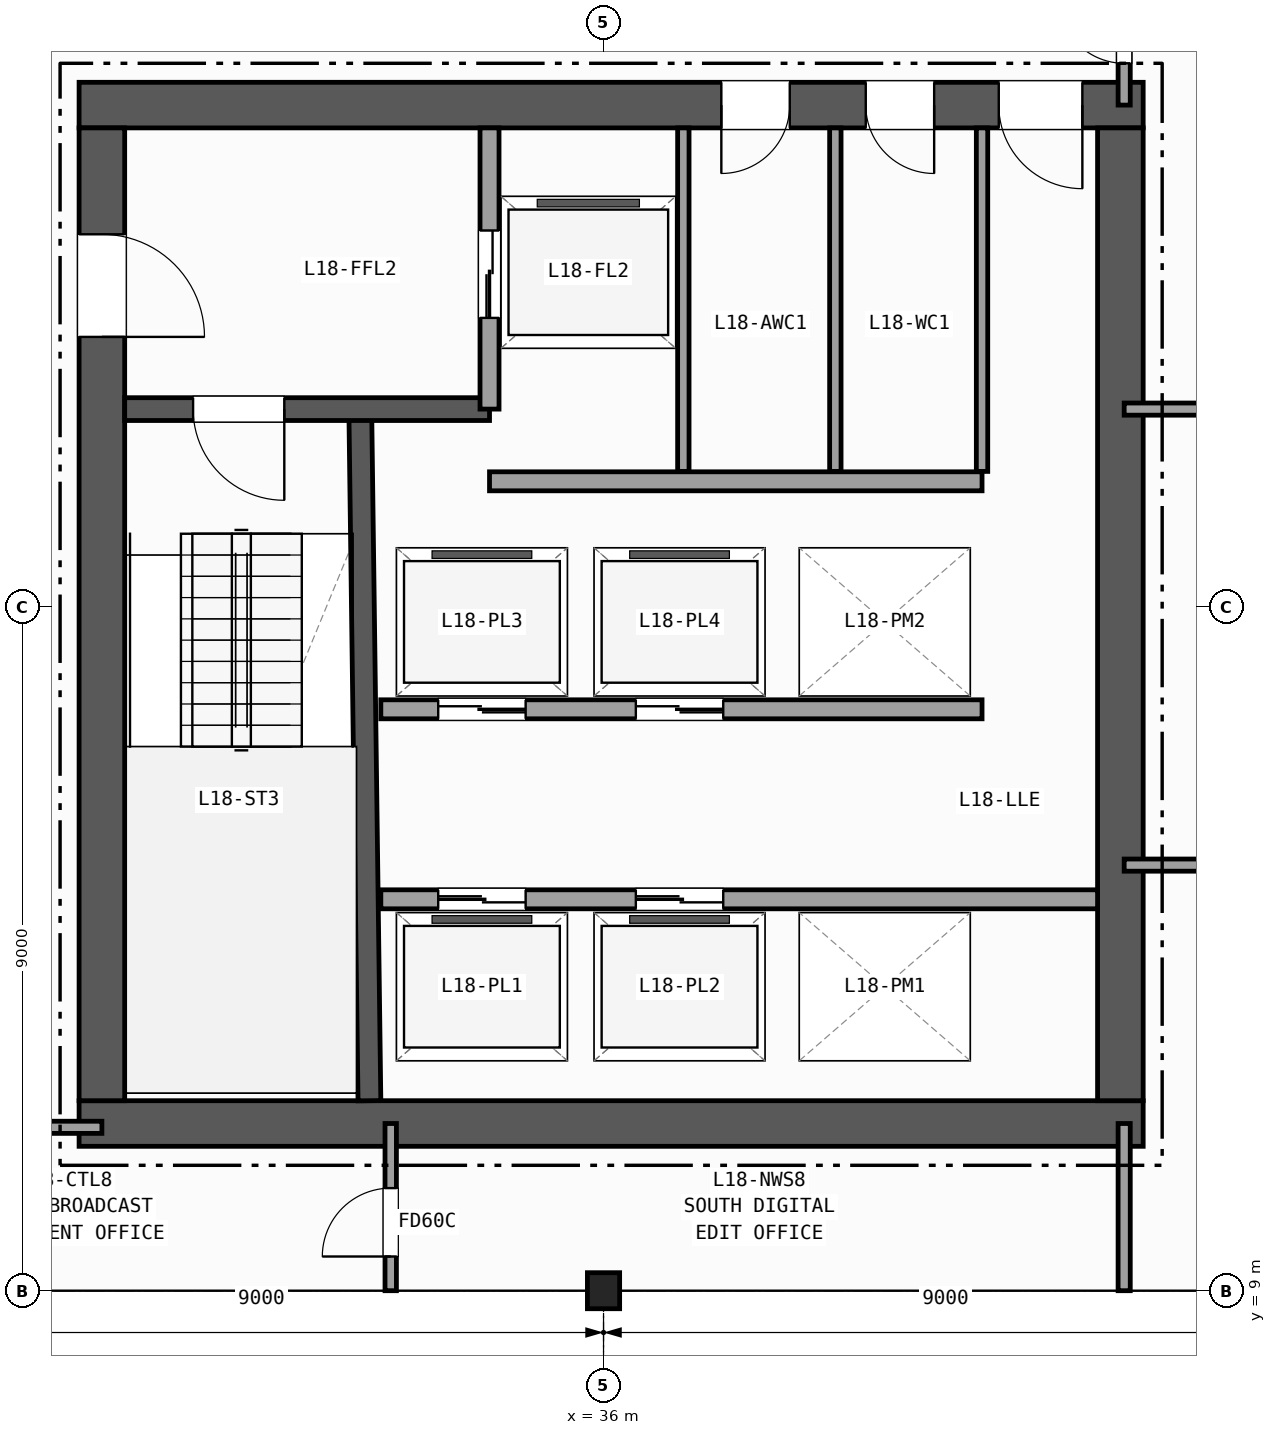
"""IFC4 building model, lengths in metres.
Left out: names, types, materials, properties, quantities, classifications, styles, units other than length and angle.
Written with IfcOpenShell. Run it as: python <this file> out.ifc"""

import sys

from ifc_helpers import new_model, si_unit, direction, frame, frame_2d, origin, origin_2d, place, context, subcontext, project, spatial, rectangle, i_section, extrude, element, fill, save


model = new_model("IFC4")
c1 = context("Model", 3, precision=1e-05, world=origin(), true_north=direction((0.0, 1.0)))
c2 = subcontext(c1, "Body", "Model", "MODEL_VIEW")
j1 = project(units=[si_unit("LENGTHUNIT", "METRE"), si_unit("PLANEANGLEUNIT", "RADIAN")], contexts=[c1])
p1 = place(None, origin())
s1 = spatial("IfcSite", under=j1, at=p1, CompositionType="ELEMENT")
p2 = place(p1, origin())
s2 = spatial("IfcBuilding", under=s1, at=p2, CompositionType="ELEMENT")
p3 = place(p2, frame((0.0, 0.0, 76.7)))
s3 = spatial("IfcBuildingStorey", under=s2, at=p3, CompositionType="ELEMENT", Elevation=76.7)
p4 = place(p3, frame((36.0, 9.0, 0.0), z_axis=(0.0, 0.0, 1.0), x_axis=(1.0, 0.0, 0.0)))
e1 = element("IfcColumn", 1, at=p4, inside=s3, PredefinedType="COLUMN", context=c2, shape_type="SweptSolid", body=[
    extrude(i_section(OverallWidth=0.424, OverallDepth=0.474, WebThickness=0.048, FlangeThickness=0.077, FilletRadius=0.015, at=origin_2d()), origin(), (0.0, 0.0, 1.0), 3.7),
])
p5 = place(p3, frame((29.1, 11.2, 0.0), z_axis=(0.0, 0.0, 1.0), x_axis=(1.0, 0.0, 0.0)))
e2 = element("IfcWall", 2, at=p5, inside=s3, PredefinedType="SHEAR", context=c2, shape_type="SweptSolid", body=[
    extrude(rectangle(XDim=14.0, YDim=0.6, at=frame_2d((7.0, 0.0))), origin(), (0.0, 0.0, 1.0), 3.42),
])
p6 = place(p3, frame((43.1, 24.6, 0.0), z_axis=(0.0, 0.0, 1.0), x_axis=(-1.0, 0.0, 0.0)))
e3 = element("IfcWall", 3, at=p6, inside=s3, PredefinedType="SHEAR", context=c2, shape_type="SweptSolid", body=[
    extrude(rectangle(XDim=14.0, YDim=0.6, at=frame_2d((7.0, 0.0))), origin(), (0.0, 0.0, 1.0), 3.42),
])
p7 = place(p6, frame((0.8, 0.0, 0.0)))
e4 = element("IfcOpeningElement", 4, at=p7, cuts=e3, PredefinedType="OPENING", context=c2, shape_type="SweptSolid", body=[
    extrude(rectangle(XDim=1.1, YDim=2.15, at=frame_2d((0.55, 1.075))), frame((0.0, 0.31, 0.0), z_axis=(0.0, -1.0, 0.0), x_axis=(1.0, 0.0, 0.0)), (0.0, 0.0, 1.0), 0.62),
])
p8 = place(p6, frame((2.75, 0.0, 0.0)))
e5 = element("IfcOpeningElement", 5, at=p8, cuts=e3, PredefinedType="OPENING", context=c2, shape_type="SweptSolid", body=[
    extrude(rectangle(XDim=0.9, YDim=2.1, at=frame_2d((0.45, 1.05))), frame((0.0, 0.31, 0.0), z_axis=(0.0, -1.0, 0.0), x_axis=(1.0, 0.0, 0.0)), (0.0, 0.0, 1.0), 0.62),
])
p9 = place(p6, frame((4.65, 0.0, 0.0)))
e6 = element("IfcOpeningElement", 6, at=p9, cuts=e3, PredefinedType="OPENING", context=c2, shape_type="SweptSolid", body=[
    extrude(rectangle(XDim=0.9, YDim=2.1, at=frame_2d((0.45, 1.05))), frame((0.0, 0.31, 0.0), z_axis=(0.0, -1.0, 0.0), x_axis=(1.0, 0.0, 0.0)), (0.0, 0.0, 1.0), 0.62),
])
p10 = place(p3, frame((29.4, 24.3, 0.0), z_axis=(0.0, 0.0, 1.0), x_axis=(0.0, -1.0, 0.0)))
e7 = element("IfcWall", 7, at=p10, inside=s3, PredefinedType="SHEAR", context=c2, shape_type="SweptSolid", body=[
    extrude(rectangle(XDim=12.8, YDim=0.6, at=frame_2d((6.4, 0.0))), origin(), (0.0, 0.0, 1.0), 3.42),
])
p11 = place(p10, frame((1.4, 0.0, 0.0)))
e8 = element("IfcOpeningElement", 8, at=p11, cuts=e7, PredefinedType="OPENING", context=c2, shape_type="SweptSolid", body=[
    extrude(rectangle(XDim=1.35, YDim=2.15, at=frame_2d((0.675, 1.075))), frame((0.0, 0.31, 0.0), z_axis=(0.0, -1.0, 0.0), x_axis=(1.0, 0.0, 0.0)), (0.0, 0.0, 1.0), 0.62),
])
p12 = place(p3, frame((42.8, 11.5, 0.0), z_axis=(0.0, 0.0, 1.0), x_axis=(0.0, 1.0, 0.0)))
e9 = element("IfcWall", 9, at=p12, inside=s3, PredefinedType="SHEAR", context=c2, shape_type="SweptSolid", body=[
    extrude(rectangle(XDim=12.8, YDim=0.6, at=frame_2d((6.4, 0.0))), origin(), (0.0, 0.0, 1.0), 3.42),
])
p13 = place(p3, frame((32.92, 11.5, 0.0), z_axis=(0.0, 0.0, 1.0), x_axis=(-0.013244407292, 0.999912288991, 0.0)))
e10 = element("IfcWall", 10, at=p13, inside=s3, PredefinedType="SHEAR", context=c2, shape_type="SweptSolid", body=[
    extrude(rectangle(XDim=9.051, YDim=0.3, at=frame_2d((4.525, 0.0))), origin(), (0.0, 0.0, 1.0), 3.42),
])
p14 = place(p3, frame((34.5, 20.6, 0.0), z_axis=(0.0, 0.0, 1.0), x_axis=(-1.0, 0.0, 0.0)))
e11 = element("IfcWall", 11, at=p14, inside=s3, PredefinedType="SHEAR", context=c2, shape_type="SweptSolid", body=[
    extrude(rectangle(XDim=4.8, YDim=0.3, at=frame_2d((2.4, 0.0))), origin(), (0.0, 0.0, 1.0), 3.42),
])
p15 = place(p14, frame((2.7, 0.0, 0.0)))
e12 = element("IfcOpeningElement", 12, at=p15, cuts=e11, PredefinedType="OPENING", context=c2, shape_type="SweptSolid", body=[
    extrude(rectangle(XDim=1.2, YDim=2.15, at=frame_2d((0.6, 1.075))), frame((0.0, 0.16, 0.0), z_axis=(0.0, -1.0, 0.0), x_axis=(1.0, 0.0, 0.0)), (0.0, 0.0, 1.0), 0.32),
])
p16 = place(p3, frame((34.5, 20.6, 0.0), z_axis=(0.0, 0.0, 1.0), x_axis=(0.0, 1.0, 0.0)))
e13 = element("IfcWall", 13, at=p16, inside=s3, PredefinedType="PARTITIONING", context=c2, shape_type="SweptSolid", body=[
    extrude(rectangle(XDim=3.7, YDim=0.25, at=frame_2d((1.85, 0.0))), origin(), (0.0, 0.0, 1.0), 3.42),
])
p17 = place(p16, frame((1.2, 0.0, 0.0)))
e14 = element("IfcOpeningElement", 14, at=p17, cuts=e13, PredefinedType="OPENING", context=c2, shape_type="SweptSolid", body=[
    extrude(rectangle(XDim=1.15, YDim=2.15, at=frame_2d((0.575, 1.075))), frame((0.0, 0.135, 0.0), z_axis=(0.0, -1.0, 0.0), x_axis=(1.0, 0.0, 0.0)), (0.0, 0.0, 1.0), 0.27),
])
p18 = place(p3, frame((34.5, 19.65, 0.0), z_axis=(0.0, 0.0, 1.0), x_axis=(1.0, 0.0, 0.0)))
e15 = element("IfcWall", 15, at=p18, inside=s3, PredefinedType="PARTITIONING", context=c2, shape_type="SweptSolid", body=[
    extrude(rectangle(XDim=6.48, YDim=0.25, at=frame_2d((3.24, 0.0))), origin(), (0.0, 0.0, 1.0), 3.42),
])
p19 = place(p3, frame((33.07, 14.15, 0.0), z_axis=(0.0, 0.0, 1.0), x_axis=(1.0, 0.0, 0.0)))
e16 = element("IfcWall", 16, at=p19, inside=s3, PredefinedType="PARTITIONING", context=c2, shape_type="SweptSolid", body=[
    extrude(rectangle(XDim=9.43, YDim=0.25, at=frame_2d((4.715, 0.0))), origin(), (0.0, 0.0, 1.0), 3.42),
])
p20 = place(p19, frame((0.755, 0.0, 0.0)))
e17 = element("IfcOpeningElement", 17, at=p20, cuts=e16, PredefinedType="OPENING", context=c2, shape_type="SweptSolid", body=[
    extrude(rectangle(XDim=1.15, YDim=2.15, at=frame_2d((0.575, 1.075))), frame((0.0, 0.135, 0.0), z_axis=(0.0, -1.0, 0.0), x_axis=(1.0, 0.0, 0.0)), (0.0, 0.0, 1.0), 0.27),
])
p21 = place(p19, frame((3.355, 0.0, 0.0)))
e18 = element("IfcOpeningElement", 18, at=p21, cuts=e16, PredefinedType="OPENING", context=c2, shape_type="SweptSolid", body=[
    extrude(rectangle(XDim=1.15, YDim=2.15, at=frame_2d((0.575, 1.075))), frame((0.0, 0.135, 0.0), z_axis=(0.0, -1.0, 0.0), x_axis=(1.0, 0.0, 0.0)), (0.0, 0.0, 1.0), 0.27),
])
p22 = place(p3, frame((40.98, 16.65, 0.0), z_axis=(0.0, 0.0, 1.0), x_axis=(-1.0, 0.0, 0.0)))
e19 = element("IfcWall", 19, at=p22, inside=s3, PredefinedType="PARTITIONING", context=c2, shape_type="SweptSolid", body=[
    extrude(rectangle(XDim=7.91, YDim=0.25, at=frame_2d((3.955, 0.0))), origin(), (0.0, 0.0, 1.0), 3.42),
])
p23 = place(p22, frame((6.005, 0.0, 0.0)))
e20 = element("IfcOpeningElement", 20, at=p23, cuts=e19, PredefinedType="OPENING", context=c2, shape_type="SweptSolid", body=[
    extrude(rectangle(XDim=1.15, YDim=2.15, at=frame_2d((0.575, 1.075))), frame((0.0, 0.135, 0.0), z_axis=(0.0, -1.0, 0.0), x_axis=(1.0, 0.0, 0.0)), (0.0, 0.0, 1.0), 0.27),
])
p24 = place(p22, frame((3.405, 0.0, 0.0)))
e21 = element("IfcOpeningElement", 21, at=p24, cuts=e19, PredefinedType="OPENING", context=c2, shape_type="SweptSolid", body=[
    extrude(rectangle(XDim=1.15, YDim=2.15, at=frame_2d((0.575, 1.075))), frame((0.0, 0.135, 0.0), z_axis=(0.0, -1.0, 0.0), x_axis=(1.0, 0.0, 0.0)), (0.0, 0.0, 1.0), 0.27),
])
for number, where, z_axis, x_axis in (
    (22, (37.05, 19.78, 0.0), (0.0, 0.0, 1.0), (0.0, 1.0, 0.0)),
    (23, (39.05, 19.78, 0.0), (0.0, 0.0, 1.0), (0.0, 1.0, 0.0)),
    (24, (40.98, 19.78, 0.0), (0.0, 0.0, 1.0), (0.0, 1.0, 0.0)),
):
    element("IfcWall", number, at=place(p3, frame(where, z_axis=z_axis, x_axis=x_axis)), inside=s3, PredefinedType="PARTITIONING", context=c2, shape_type="SweptSolid", body=[
        extrude(rectangle(XDim=4.52, YDim=0.15, at=frame_2d((2.26, 0.0))), origin(), (0.0, 0.0, 1.0), 3.42),
    ])
p25 = place(p3, frame((24.65, 11.15, 0.0), z_axis=(0.0, 0.0, 1.0), x_axis=(1.0, 0.0, 0.0)))
e25 = element("IfcWall", 25, at=p25, inside=s3, PredefinedType="PARTITIONING", context=c2, shape_type="SweptSolid", body=[
    extrude(rectangle(XDim=4.75, YDim=0.16, at=frame_2d((2.375, 0.0))), origin(), (0.0, 0.0, 1.0), 2.792),
])
p26 = place(p25, frame((1.2, 0.0, 0.0)))
e26 = element("IfcOpeningElement", 26, at=p26, cuts=e25, PredefinedType="OPENING", context=c2, shape_type="SweptSolid", body=[
    extrude(rectangle(XDim=1.05, YDim=2.15, at=frame_2d((0.525, 1.075))), frame((0.0, 0.09, 0.0), z_axis=(0.0, -1.0, 0.0), x_axis=(1.0, 0.0, 0.0)), (0.0, 0.0, 1.0), 0.18),
])
p27 = place(p3, frame((33.2, 9.0, 0.0), z_axis=(0.0, 0.0, 1.0), x_axis=(0.0, 1.0, 0.0)))
e27 = element("IfcWall", 27, at=p27, inside=s3, PredefinedType="PARTITIONING", context=c2, shape_type="SweptSolid", body=[
    extrude(rectangle(XDim=2.2, YDim=0.15, at=frame_2d((1.1, 0.0))), origin(), (0.0, 0.0, 1.0), 2.627),
])
p28 = place(p27, frame((0.45, 0.0, 0.0)))
e28 = element("IfcOpeningElement", 28, at=p28, cuts=e27, PredefinedType="OPENING", context=c2, shape_type="SweptSolid", body=[
    extrude(rectangle(XDim=0.9, YDim=2.1, at=frame_2d((0.45, 1.05))), frame((0.0, 0.085, 0.0), z_axis=(0.0, -1.0, 0.0), x_axis=(1.0, 0.0, 0.0)), (0.0, 0.0, 1.0), 0.17),
])
p29 = place(p3, frame((42.85, 9.0, 0.0), z_axis=(0.0, 0.0, 1.0), x_axis=(0.0, 1.0, 0.0)))
e29 = element("IfcWall", 29, at=p29, inside=s3, PredefinedType="PARTITIONING", context=c2, shape_type="SweptSolid", body=[
    extrude(rectangle(XDim=2.2, YDim=0.16, at=frame_2d((1.1, 0.0))), origin(), (0.0, 0.0, 1.0), 2.627),
])
p30 = place(p3, frame((42.85, 24.6, 0.0), z_axis=(0.0, 0.0, 1.0), x_axis=(0.0, 1.0, 0.0)))
e30 = element("IfcWall", 30, at=p30, inside=s3, PredefinedType="PARTITIONING", context=c2, shape_type="SweptSolid", body=[
    extrude(rectangle(XDim=2.4, YDim=0.16, at=frame_2d((1.2, 0.0))), origin(), (0.0, 0.0, 1.0), 2.627),
])
p31 = place(p30, frame((0.55, 0.0, 0.0)))
e31 = element("IfcOpeningElement", 31, at=p31, cuts=e30, PredefinedType="OPENING", context=c2, shape_type="SweptSolid", body=[
    extrude(rectangle(XDim=0.86, YDim=2.05, at=frame_2d((0.43, 1.025))), frame((0.0, 0.09, 0.0), z_axis=(0.0, -1.0, 0.0), x_axis=(1.0, 0.0, 0.0)), (0.0, 0.0, 1.0), 0.18),
])
p32 = place(p3, frame((42.85, 14.6, 0.0), z_axis=(0.0, 0.0, 1.0), x_axis=(1.0, 0.0, 0.0)))
e32 = element("IfcWall", 32, at=p32, inside=s3, PredefinedType="PARTITIONING", context=c2, shape_type="SweptSolid", body=[
    extrude(rectangle(XDim=20.5, YDim=0.16, at=frame_2d((10.25, 0.0))), origin(), (0.0, 0.0, 1.0), 3.42),
])
p33 = place(p32, frame((3.4, 0.0, 0.0)))
e33 = element("IfcOpeningElement", 33, at=p33, cuts=e32, PredefinedType="OPENING", context=c2, shape_type="SweptSolid", body=[
    extrude(rectangle(XDim=0.95, YDim=2.1, at=frame_2d((0.475, 1.05))), frame((0.0, 0.09, 0.0), z_axis=(0.0, -1.0, 0.0), x_axis=(1.0, 0.0, 0.0)), (0.0, 0.0, 1.0), 0.18),
])
p34 = place(p3, frame((42.85, 20.6, 0.0), z_axis=(0.0, 0.0, 1.0), x_axis=(1.0, 0.0, 0.0)))
e34 = element("IfcWall", 34, at=p34, inside=s3, PredefinedType="PARTITIONING", context=c2, shape_type="SweptSolid", body=[
    extrude(rectangle(XDim=20.582, YDim=0.16, at=frame_2d((10.291, 0.0))), origin(), (0.0, 0.0, 1.0), 3.42),
])
p35 = place(p34, frame((3.4, 0.0, 0.0)))
e35 = element("IfcOpeningElement", 35, at=p35, cuts=e34, PredefinedType="OPENING", context=c2, shape_type="SweptSolid", body=[
    extrude(rectangle(XDim=1.0, YDim=2.1, at=frame_2d((0.5, 1.05))), frame((0.0, 0.09, 0.0), z_axis=(0.0, -1.0, 0.0), x_axis=(1.0, 0.0, 0.0)), (0.0, 0.0, 1.0), 0.18),
])
p36 = place(p15, origin())
e36 = element("IfcDoor", 36, at=p36, inside=s3, OperationType="SINGLE_SWING_LEFT", PredefinedType="DOOR", context=c2, shape_type="SweptSolid", body=[
    extrude(rectangle(XDim=1.2, YDim=2.15, at=frame_2d((0.6, 1.075))), frame((0.0, 0.025, 0.0), z_axis=(0.0, -1.0, 0.0), x_axis=(1.0, 0.0, 0.0)), (0.0, 0.0, 1.0), 0.05),
])
fill(e12, e36)
p37 = place(p11, origin())
e37 = element("IfcDoor", 37, at=p37, inside=s3, OperationType="SINGLE_SWING_RIGHT", PredefinedType="DOOR", context=c2, shape_type="SweptSolid", body=[
    extrude(rectangle(XDim=1.35, YDim=2.15, at=frame_2d((0.675, 1.075))), frame((0.0, 0.025, 0.0), z_axis=(0.0, -1.0, 0.0), x_axis=(1.0, 0.0, 0.0)), (0.0, 0.0, 1.0), 0.05),
])
fill(e8, e37)
p38 = place(p7, origin())
e38 = element("IfcDoor", 38, at=p38, inside=s3, OperationType="SINGLE_SWING_LEFT", PredefinedType="DOOR", context=c2, shape_type="SweptSolid", body=[
    extrude(rectangle(XDim=1.1, YDim=2.15, at=frame_2d((0.55, 1.075))), frame((0.0, 0.025, 0.0), z_axis=(0.0, -1.0, 0.0), x_axis=(1.0, 0.0, 0.0)), (0.0, 0.0, 1.0), 0.05),
])
fill(e4, e38)
p39 = place(p8, origin())
e39 = element("IfcDoor", 39, at=p39, inside=s3, OperationType="SINGLE_SWING_LEFT", PredefinedType="DOOR", context=c2, shape_type="SweptSolid", body=[
    extrude(rectangle(XDim=0.9, YDim=2.1, at=frame_2d((0.45, 1.05))), frame((0.0, 0.025, 0.0), z_axis=(0.0, -1.0, 0.0), x_axis=(1.0, 0.0, 0.0)), (0.0, 0.0, 1.0), 0.05),
])
fill(e5, e39)
p40 = place(p9, origin())
e40 = element("IfcDoor", 40, at=p40, inside=s3, OperationType="SINGLE_SWING_RIGHT", PredefinedType="DOOR", context=c2, shape_type="SweptSolid", body=[
    extrude(rectangle(XDim=0.9, YDim=2.1, at=frame_2d((0.45, 1.05))), frame((0.0, 0.025, 0.0), z_axis=(0.0, -1.0, 0.0), x_axis=(1.0, 0.0, 0.0)), (0.0, 0.0, 1.0), 0.05),
])
fill(e6, e40)
p41 = place(p17, origin())
e41 = element("IfcDoor", 41, at=p41, inside=s3, OperationType="DOUBLE_DOOR_SLIDING", PredefinedType="DOOR", context=c2, shape_type="SweptSolid", body=[
    extrude(rectangle(XDim=1.15, YDim=2.15, at=frame_2d((0.575, 1.075))), frame((0.0, 0.025, 0.0), z_axis=(0.0, -1.0, 0.0), x_axis=(1.0, 0.0, 0.0)), (0.0, 0.0, 1.0), 0.05),
])
fill(e14, e41)
p42 = place(p20, origin())
e42 = element("IfcDoor", 42, at=p42, inside=s3, OperationType="DOUBLE_DOOR_SLIDING", PredefinedType="DOOR", context=c2, shape_type="SweptSolid", body=[
    extrude(rectangle(XDim=1.15, YDim=2.15, at=frame_2d((0.575, 1.075))), frame((0.0, 0.025, 0.0), z_axis=(0.0, -1.0, 0.0), x_axis=(1.0, 0.0, 0.0)), (0.0, 0.0, 1.0), 0.05),
])
fill(e17, e42)
p43 = place(p21, origin())
e43 = element("IfcDoor", 43, at=p43, inside=s3, OperationType="DOUBLE_DOOR_SLIDING", PredefinedType="DOOR", context=c2, shape_type="SweptSolid", body=[
    extrude(rectangle(XDim=1.15, YDim=2.15, at=frame_2d((0.575, 1.075))), frame((0.0, 0.025, 0.0), z_axis=(0.0, -1.0, 0.0), x_axis=(1.0, 0.0, 0.0)), (0.0, 0.0, 1.0), 0.05),
])
fill(e18, e43)
p44 = place(p23, origin())
e44 = element("IfcDoor", 44, at=p44, inside=s3, OperationType="DOUBLE_DOOR_SLIDING", PredefinedType="DOOR", context=c2, shape_type="SweptSolid", body=[
    extrude(rectangle(XDim=1.15, YDim=2.15, at=frame_2d((0.575, 1.075))), frame((0.0, 0.025, 0.0), z_axis=(0.0, -1.0, 0.0), x_axis=(1.0, 0.0, 0.0)), (0.0, 0.0, 1.0), 0.05),
])
fill(e20, e44)
p45 = place(p24, origin())
e45 = element("IfcDoor", 45, at=p45, inside=s3, OperationType="DOUBLE_DOOR_SLIDING", PredefinedType="DOOR", context=c2, shape_type="SweptSolid", body=[
    extrude(rectangle(XDim=1.15, YDim=2.15, at=frame_2d((0.575, 1.075))), frame((0.0, 0.025, 0.0), z_axis=(0.0, -1.0, 0.0), x_axis=(1.0, 0.0, 0.0)), (0.0, 0.0, 1.0), 0.05),
])
fill(e21, e45)
p46 = place(p28, origin())
e46 = element("IfcDoor", 46, at=p46, inside=s3, OperationType="SINGLE_SWING_LEFT", PredefinedType="DOOR", context=c2, shape_type="SweptSolid", body=[
    extrude(rectangle(XDim=0.9, YDim=2.1, at=frame_2d((0.45, 1.05))), frame((0.0, 0.025, 0.0), z_axis=(0.0, -1.0, 0.0), x_axis=(1.0, 0.0, 0.0)), (0.0, 0.0, 1.0), 0.05),
])
fill(e28, e46)
p47 = place(p31, origin())
e47 = element("IfcDoor", 47, at=p47, inside=s3, OperationType="SINGLE_SWING_RIGHT", PredefinedType="DOOR", context=c2, shape_type="SweptSolid", body=[
    extrude(rectangle(XDim=0.86, YDim=2.05, at=frame_2d((0.43, 1.025))), frame((0.0, 0.025, 0.0), z_axis=(0.0, -1.0, 0.0), x_axis=(1.0, 0.0, 0.0)), (0.0, 0.0, 1.0), 0.05),
])
fill(e31, e47)
save(model, sys.argv[1])
